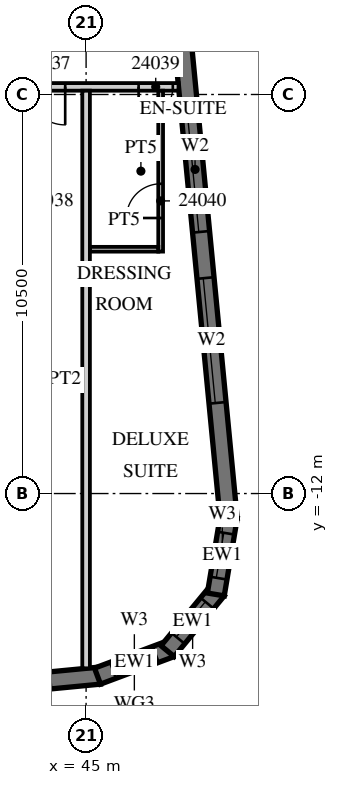
"""IFC4 building model, lengths in metres.
Left out: names, types, materials, properties, quantities, classifications, styles, units other than length and angle.
Written with IfcOpenShell. Run it as: python <this file> out.ifc"""

import sys

from ifc_helpers import new_model, si_unit, direction, frame, frame_2d, origin, place, context, subcontext, project, spatial, polyline, rectangle, outline, extrude, element, fill, save


model = new_model("IFC4")
c1 = context("Model", 3, precision=1e-05, world=origin(), true_north=direction((0.0, 1.0)))
c2 = subcontext(c1, "Body", "Model", "MODEL_VIEW")
j1 = project(units=[si_unit("LENGTHUNIT", "METRE"), si_unit("PLANEANGLEUNIT", "RADIAN")], contexts=[c1])
p1 = place(None, origin())
s1 = spatial("IfcSite", under=j1, at=p1, CompositionType="ELEMENT")
p2 = place(p1, origin())
s2 = spatial("IfcBuilding", under=s1, at=p2, CompositionType="ELEMENT")
p3 = place(p2, frame((0.0, 0.0, 114.1)))
s3 = spatial("IfcBuildingStorey", under=s2, at=p3, CompositionType="ELEMENT", Elevation=114.1)
p4 = place(p3, frame((-13.521, -22.46, 0.0), z_axis=(0.0, 0.0, 1.0), x_axis=(0.995396096335, 0.095846812164, 0.0)))
e1 = element("IfcWall", 1, at=p4, inside=s3, PredefinedType="SOLIDWALL", context=c2, shape_type="SweptSolid", body=[
    extrude(rectangle(XDim=59.151, YDim=0.45, at=frame_2d((29.575, 0.0))), origin(), (0.0, 0.0, 1.0), 3.02),
])
p5 = place(p4, frame((0.91, 0.0, 0.45)))
e2 = element("IfcOpeningElement", 2, at=p5, cuts=e1, PredefinedType="OPENING", context=c2, shape_type="SweptSolid", body=[
    extrude(rectangle(XDim=2.7, YDim=2.25, at=frame_2d((1.35, 1.125))), frame((0.0, 0.235, 0.0), z_axis=(0.0, -1.0, 0.0), x_axis=(1.0, 0.0, 0.0)), (0.0, 0.0, 1.0), 0.47),
])
p6 = place(p4, frame((5.431, 0.0, 0.45)))
e3 = element("IfcOpeningElement", 3, at=p6, cuts=e1, PredefinedType="OPENING", context=c2, shape_type="SweptSolid", body=[
    extrude(rectangle(XDim=2.7, YDim=2.25, at=frame_2d((1.35, 1.125))), frame((0.0, 0.235, 0.0), z_axis=(0.0, -1.0, 0.0), x_axis=(1.0, 0.0, 0.0)), (0.0, 0.0, 1.0), 0.47),
])
p7 = place(p4, frame((9.952, 0.0, 0.45)))
e4 = element("IfcOpeningElement", 4, at=p7, cuts=e1, PredefinedType="OPENING", context=c2, shape_type="SweptSolid", body=[
    extrude(rectangle(XDim=2.7, YDim=2.25, at=frame_2d((1.35, 1.125))), frame((0.0, 0.235, 0.0), z_axis=(0.0, -1.0, 0.0), x_axis=(1.0, 0.0, 0.0)), (0.0, 0.0, 1.0), 0.47),
])
p8 = place(p4, frame((14.473, 0.0, 0.45)))
e5 = element("IfcOpeningElement", 5, at=p8, cuts=e1, PredefinedType="OPENING", context=c2, shape_type="SweptSolid", body=[
    extrude(rectangle(XDim=2.7, YDim=2.25, at=frame_2d((1.35, 1.125))), frame((0.0, 0.235, 0.0), z_axis=(0.0, -1.0, 0.0), x_axis=(1.0, 0.0, 0.0)), (0.0, 0.0, 1.0), 0.47),
])
p9 = place(p4, frame((18.994, 0.0, 0.45)))
e6 = element("IfcOpeningElement", 6, at=p9, cuts=e1, PredefinedType="OPENING", context=c2, shape_type="SweptSolid", body=[
    extrude(rectangle(XDim=2.7, YDim=2.25, at=frame_2d((1.35, 1.125))), frame((0.0, 0.235, 0.0), z_axis=(0.0, -1.0, 0.0), x_axis=(1.0, 0.0, 0.0)), (0.0, 0.0, 1.0), 0.47),
])
p10 = place(p4, frame((23.514, 0.0, 0.45)))
e7 = element("IfcOpeningElement", 7, at=p10, cuts=e1, PredefinedType="OPENING", context=c2, shape_type="SweptSolid", body=[
    extrude(rectangle(XDim=2.7, YDim=2.25, at=frame_2d((1.35, 1.125))), frame((0.0, 0.235, 0.0), z_axis=(0.0, -1.0, 0.0), x_axis=(1.0, 0.0, 0.0)), (0.0, 0.0, 1.0), 0.47),
])
p11 = place(p4, frame((28.035, 0.0, 0.45)))
e8 = element("IfcOpeningElement", 8, at=p11, cuts=e1, PredefinedType="OPENING", context=c2, shape_type="SweptSolid", body=[
    extrude(rectangle(XDim=2.7, YDim=2.25, at=frame_2d((1.35, 1.125))), frame((0.0, 0.235, 0.0), z_axis=(0.0, -1.0, 0.0), x_axis=(1.0, 0.0, 0.0)), (0.0, 0.0, 1.0), 0.47),
])
p12 = place(p4, frame((32.556, 0.0, 0.45)))
e9 = element("IfcOpeningElement", 9, at=p12, cuts=e1, PredefinedType="OPENING", context=c2, shape_type="SweptSolid", body=[
    extrude(rectangle(XDim=2.7, YDim=2.25, at=frame_2d((1.35, 1.125))), frame((0.0, 0.235, 0.0), z_axis=(0.0, -1.0, 0.0), x_axis=(1.0, 0.0, 0.0)), (0.0, 0.0, 1.0), 0.47),
])
p13 = place(p4, frame((37.077, 0.0, 0.45)))
e10 = element("IfcOpeningElement", 10, at=p13, cuts=e1, PredefinedType="OPENING", context=c2, shape_type="SweptSolid", body=[
    extrude(rectangle(XDim=2.7, YDim=2.25, at=frame_2d((1.35, 1.125))), frame((0.0, 0.235, 0.0), z_axis=(0.0, -1.0, 0.0), x_axis=(1.0, 0.0, 0.0)), (0.0, 0.0, 1.0), 0.47),
])
p14 = place(p4, frame((41.598, 0.0, 0.45)))
e11 = element("IfcOpeningElement", 11, at=p14, cuts=e1, PredefinedType="OPENING", context=c2, shape_type="SweptSolid", body=[
    extrude(rectangle(XDim=2.7, YDim=2.25, at=frame_2d((1.35, 1.125))), frame((0.0, 0.235, 0.0), z_axis=(0.0, -1.0, 0.0), x_axis=(1.0, 0.0, 0.0)), (0.0, 0.0, 1.0), 0.47),
])
p15 = place(p4, frame((46.118, 0.0, 0.45)))
e12 = element("IfcOpeningElement", 12, at=p15, cuts=e1, PredefinedType="OPENING", context=c2, shape_type="SweptSolid", body=[
    extrude(rectangle(XDim=2.7, YDim=2.25, at=frame_2d((1.35, 1.125))), frame((0.0, 0.235, 0.0), z_axis=(0.0, -1.0, 0.0), x_axis=(1.0, 0.0, 0.0)), (0.0, 0.0, 1.0), 0.47),
])
p16 = place(p4, frame((50.639, 0.0, 0.45)))
e13 = element("IfcOpeningElement", 13, at=p16, cuts=e1, PredefinedType="OPENING", context=c2, shape_type="SweptSolid", body=[
    extrude(rectangle(XDim=2.7, YDim=2.25, at=frame_2d((1.35, 1.125))), frame((0.0, 0.235, 0.0), z_axis=(0.0, -1.0, 0.0), x_axis=(1.0, 0.0, 0.0)), (0.0, 0.0, 1.0), 0.47),
])
p17 = place(p4, frame((55.15, 0.0, 0.45)))
e14 = element("IfcOpeningElement", 14, at=p17, cuts=e1, PredefinedType="OPENING", context=c2, shape_type="SweptSolid", body=[
    extrude(rectangle(XDim=2.7, YDim=2.25, at=frame_2d((1.35, 1.125))), frame((0.0, 0.235, 0.0), z_axis=(0.0, -1.0, 0.0), x_axis=(1.0, 0.0, 0.0)), (0.0, 0.0, 1.0), 0.47),
])
p18 = place(p3, frame((45.3, -16.804, 0.0), z_axis=(0.0, 0.0, 1.0), x_axis=(0.936677599948, 0.350192909346, 0.0)))
e15 = element("IfcWall", 15, at=p18, inside=s3, PredefinedType="SOLIDWALL", context=c2, shape_type="SweptSolid", body=[
    extrude(outline(polyline([(0.0, -0.225), (2.071, -0.225), (1.95, 0.225), (0.121, 0.225), (0.0, -0.225)])), origin(), (0.0, 0.0, 1.0), 3.02),
])
p19 = place(p18, frame((0.435, 0.0, 0.45)))
e16 = element("IfcOpeningElement", 16, at=p19, cuts=e15, PredefinedType="OPENING", context=c2, shape_type="SweptSolid", body=[
    extrude(rectangle(XDim=1.2, YDim=2.25, at=frame_2d((0.6, 1.125))), frame((0.0, 0.235, 0.0), z_axis=(0.0, -1.0, 0.0), x_axis=(1.0, 0.0, 0.0)), (0.0, 0.0, 1.0), 0.47),
])
p20 = place(p3, frame((47.145, -16.147, 0.0), z_axis=(0.0, 0.0, 1.0), x_axis=(0.635988241739, 0.771698747161, 0.0)))
e17 = element("IfcWall", 17, at=p20, inside=s3, PredefinedType="SOLIDWALL", context=c2, shape_type="SweptSolid", body=[
    extrude(outline(polyline([(0.0, -0.225), (2.071, -0.225), (1.95, 0.225), (0.121, 0.225), (0.0, -0.225)])), origin(), (0.0, 0.0, 1.0), 3.02),
])
p21 = place(p20, frame((0.435, 0.0, 0.45)))
e18 = element("IfcOpeningElement", 18, at=p21, cuts=e17, PredefinedType="OPENING", context=c2, shape_type="SweptSolid", body=[
    extrude(rectangle(XDim=1.2, YDim=2.25, at=frame_2d((0.6, 1.125))), frame((0.0, 0.235, 0.0), z_axis=(0.0, -1.0, 0.0), x_axis=(1.0, 0.0, 0.0)), (0.0, 0.0, 1.0), 0.47),
])
p22 = place(p3, frame((48.413, -14.655, 0.0), z_axis=(0.0, 0.0, 1.0), x_axis=(0.165068144653, 0.986282164302, 0.0)))
e19 = element("IfcWall", 19, at=p22, inside=s3, PredefinedType="SOLIDWALL", context=c2, shape_type="SweptSolid", body=[
    extrude(outline(polyline([(0.0, -0.225), (2.071, -0.225), (1.95, 0.225), (0.121, 0.225), (0.0, -0.225)])), origin(), (0.0, 0.0, 1.0), 3.02),
])
p23 = place(p22, frame((0.435, 0.0, 0.45)))
e20 = element("IfcOpeningElement", 20, at=p23, cuts=e19, PredefinedType="OPENING", context=c2, shape_type="SweptSolid", body=[
    extrude(rectangle(XDim=1.2, YDim=2.25, at=frame_2d((0.6, 1.125))), frame((0.0, 0.235, 0.0), z_axis=(0.0, -1.0, 0.0), x_axis=(1.0, 0.0, 0.0)), (0.0, 0.0, 1.0), 0.47),
])
p24 = place(p3, frame((48.753, -12.672, 0.0), z_axis=(0.0, 0.0, 1.0), x_axis=(-0.095842661909, 0.995396495954, 0.0)))
e21 = element("IfcWall", 21, at=p24, inside=s3, PredefinedType="SOLIDWALL", context=c2, shape_type="SweptSolid", body=[
    extrude(rectangle(XDim=35.0, YDim=0.45, at=frame_2d((17.5, 0.0))), origin(), (0.0, 0.0, 1.0), 3.02),
])
p25 = place(p24, frame((3.072, 0.0, 0.45)))
e22 = element("IfcOpeningElement", 22, at=p25, cuts=e21, PredefinedType="OPENING", context=c2, shape_type="SweptSolid", body=[
    extrude(rectangle(XDim=3.3, YDim=2.25, at=frame_2d((1.65, 1.125))), frame((0.0, 0.235, 0.0), z_axis=(0.0, -1.0, 0.0), x_axis=(1.0, 0.0, 0.0)), (0.0, 0.0, 1.0), 0.47),
])
p26 = place(p24, frame((7.593, 0.0, 0.45)))
e23 = element("IfcOpeningElement", 23, at=p26, cuts=e21, PredefinedType="OPENING", context=c2, shape_type="SweptSolid", body=[
    extrude(rectangle(XDim=3.3, YDim=2.25, at=frame_2d((1.65, 1.125))), frame((0.0, 0.235, 0.0), z_axis=(0.0, -1.0, 0.0), x_axis=(1.0, 0.0, 0.0)), (0.0, 0.0, 1.0), 0.47),
])
p27 = place(p3, frame((-13.5, -1.3, 0.0), z_axis=(0.0, 0.0, 1.0), x_axis=(1.0, 0.0, 0.0)))
e24 = element("IfcWall", 24, at=p27, inside=s3, PredefinedType="PARTITIONING", context=c2, shape_type="SweptSolid", body=[
    extrude(rectangle(XDim=60.932, YDim=0.2, at=frame_2d((30.466, 0.0))), origin(), (0.0, 0.0, 1.0), 3.02),
])
p28 = place(p27, frame((0.575, 0.0, 0.0)))
e25 = element("IfcOpeningElement", 25, at=p28, cuts=e24, PredefinedType="OPENING", context=c2, shape_type="SweptSolid", body=[
    extrude(rectangle(XDim=1.0, YDim=2.1, at=frame_2d((0.5, 1.05))), frame((0.0, 0.11, 0.0), z_axis=(0.0, -1.0, 0.0), x_axis=(1.0, 0.0, 0.0)), (0.0, 0.0, 1.0), 0.22),
])
p29 = place(p27, frame((5.075, 0.0, 0.0)))
e26 = element("IfcOpeningElement", 26, at=p29, cuts=e24, PredefinedType="OPENING", context=c2, shape_type="SweptSolid", body=[
    extrude(rectangle(XDim=1.0, YDim=2.1, at=frame_2d((0.5, 1.05))), frame((0.0, 0.11, 0.0), z_axis=(0.0, -1.0, 0.0), x_axis=(1.0, 0.0, 0.0)), (0.0, 0.0, 1.0), 0.22),
])
p30 = place(p27, frame((11.925, 0.0, 0.0)))
e27 = element("IfcOpeningElement", 27, at=p30, cuts=e24, PredefinedType="OPENING", context=c2, shape_type="SweptSolid", body=[
    extrude(rectangle(XDim=1.0, YDim=2.1, at=frame_2d((0.5, 1.05))), frame((0.0, 0.11, 0.0), z_axis=(0.0, -1.0, 0.0), x_axis=(1.0, 0.0, 0.0)), (0.0, 0.0, 1.0), 0.22),
])
p31 = place(p27, frame((15.938, 0.0, 0.0)))
e28 = element("IfcOpeningElement", 28, at=p31, cuts=e24, PredefinedType="OPENING", context=c2, shape_type="SweptSolid", body=[
    extrude(rectangle(XDim=1.2, YDim=2.1, at=frame_2d((0.6, 1.05))), frame((0.0, 0.11, 0.0), z_axis=(0.0, -1.0, 0.0), x_axis=(1.0, 0.0, 0.0)), (0.0, 0.0, 1.0), 0.22),
])
p32 = place(p27, frame((25.45, 0.0, 0.0)))
e29 = element("IfcOpeningElement", 29, at=p32, cuts=e24, PredefinedType="OPENING", context=c2, shape_type="SweptSolid", body=[
    extrude(rectangle(XDim=1.0, YDim=2.1, at=frame_2d((0.5, 1.05))), frame((0.0, 0.11, 0.0), z_axis=(0.0, -1.0, 0.0), x_axis=(1.0, 0.0, 0.0)), (0.0, 0.0, 1.0), 0.22),
])
p33 = place(p27, frame((27.55, 0.0, 0.0)))
e30 = element("IfcOpeningElement", 30, at=p33, cuts=e24, PredefinedType="OPENING", context=c2, shape_type="SweptSolid", body=[
    extrude(rectangle(XDim=1.0, YDim=2.1, at=frame_2d((0.5, 1.05))), frame((0.0, 0.11, 0.0), z_axis=(0.0, -1.0, 0.0), x_axis=(1.0, 0.0, 0.0)), (0.0, 0.0, 1.0), 0.22),
])
p34 = place(p27, frame((33.938, 0.0, 0.0)))
e31 = element("IfcOpeningElement", 31, at=p34, cuts=e24, PredefinedType="OPENING", context=c2, shape_type="SweptSolid", body=[
    extrude(rectangle(XDim=1.2, YDim=2.1, at=frame_2d((0.6, 1.05))), frame((0.0, 0.11, 0.0), z_axis=(0.0, -1.0, 0.0), x_axis=(1.0, 0.0, 0.0)), (0.0, 0.0, 1.0), 0.22),
])
p35 = place(p27, frame((45.862, 0.0, 0.0)))
e32 = element("IfcOpeningElement", 32, at=p35, cuts=e24, PredefinedType="OPENING", context=c2, shape_type="SweptSolid", body=[
    extrude(rectangle(XDim=1.2, YDim=2.1, at=frame_2d((0.6, 1.05))), frame((0.0, 0.11, 0.0), z_axis=(0.0, -1.0, 0.0), x_axis=(1.0, 0.0, 0.0)), (0.0, 0.0, 1.0), 0.22),
])
p36 = place(p27, frame((52.425, 0.0, 0.0)))
e33 = element("IfcOpeningElement", 33, at=p36, cuts=e24, PredefinedType="OPENING", context=c2, shape_type="SweptSolid", body=[
    extrude(rectangle(XDim=1.0, YDim=2.1, at=frame_2d((0.5, 1.05))), frame((0.0, 0.11, 0.0), z_axis=(0.0, -1.0, 0.0), x_axis=(1.0, 0.0, 0.0)), (0.0, 0.0, 1.0), 0.22),
])
p37 = place(p27, frame((56.95, 0.0, 0.0)))
e34 = element("IfcOpeningElement", 34, at=p37, cuts=e24, PredefinedType="OPENING", context=c2, shape_type="SweptSolid", body=[
    extrude(rectangle(XDim=1.0, YDim=2.1, at=frame_2d((0.5, 1.05))), frame((0.0, 0.11, 0.0), z_axis=(0.0, -1.0, 0.0), x_axis=(1.0, 0.0, 0.0)), (0.0, 0.0, 1.0), 0.22),
])
p38 = place(p27, frame((59.882, 0.0, 0.0)))
e35 = element("IfcOpeningElement", 35, at=p38, cuts=e24, PredefinedType="OPENING", context=c2, shape_type="SweptSolid", body=[
    extrude(rectangle(XDim=0.9, YDim=2.1, at=frame_2d((0.45, 1.05))), frame((0.0, 0.11, 0.0), z_axis=(0.0, -1.0, 0.0), x_axis=(1.0, 0.0, 0.0)), (0.0, 0.0, 1.0), 0.22),
])
p39 = place(p3, frame((45.0, -16.599, 0.0), z_axis=(0.0, 0.0, 1.0), x_axis=(0.0, 1.0, 0.0)))
e36 = element("IfcWall", 36, at=p39, inside=s3, PredefinedType="PARTITIONING", context=c2, shape_type="SweptSolid", body=[
    extrude(rectangle(XDim=15.199, YDim=0.2, at=frame_2d((7.6, 0.0))), origin(), (0.0, 0.0, 1.0), 3.02),
])
p40 = place(p3, frame((46.962, -5.634, 0.0), z_axis=(0.0, 0.0, 1.0), x_axis=(0.0, 1.0, 0.0)))
e37 = element("IfcWall", 37, at=p40, inside=s3, PredefinedType="PARTITIONING", context=c2, shape_type="SweptSolid", body=[
    extrude(rectangle(XDim=4.234, YDim=0.125, at=frame_2d((2.117, 0.0))), origin(), (0.0, 0.0, 1.0), 3.02),
])
p41 = place(p40, frame((0.884, 0.0, 0.0)))
e38 = element("IfcOpeningElement", 38, at=p41, cuts=e37, PredefinedType="OPENING", context=c2, shape_type="SweptSolid", body=[
    extrude(rectangle(XDim=0.9, YDim=2.1, at=frame_2d((0.45, 1.05))), frame((0.0, 0.073, 0.0), z_axis=(0.0, -1.0, 0.0), x_axis=(1.0, 0.0, 0.0)), (0.0, 0.0, 1.0), 0.145),
])
p42 = place(p3, frame((45.1, -5.572, 0.0), z_axis=(0.0, 0.0, 1.0), x_axis=(1.0, 0.0, 0.0)))
e39 = element("IfcWall", 39, at=p42, inside=s3, PredefinedType="PARTITIONING", context=c2, shape_type="SweptSolid", body=[
    extrude(rectangle(XDim=1.8, YDim=0.125, at=frame_2d((0.9, 0.0))), origin(), (0.0, 0.0, 1.0), 3.02),
])
p43 = place(p19, origin())
e40 = element("IfcWindow", 40, at=p43, inside=s3, PartitioningType="SINGLE_PANEL", PredefinedType="WINDOW", context=c2, shape_type="SweptSolid", body=[
    extrude(rectangle(XDim=1.2, YDim=2.25, at=frame_2d((0.6, 1.125))), frame((0.0, 0.09, 0.0), z_axis=(0.0, -1.0, 0.0), x_axis=(1.0, 0.0, 0.0)), (0.0, 0.0, 1.0), 0.06),
])
fill(e16, e40)
p44 = place(p21, origin())
e41 = element("IfcWindow", 41, at=p44, inside=s3, PartitioningType="SINGLE_PANEL", PredefinedType="WINDOW", context=c2, shape_type="SweptSolid", body=[
    extrude(rectangle(XDim=1.2, YDim=2.25, at=frame_2d((0.6, 1.125))), frame((0.0, 0.09, 0.0), z_axis=(0.0, -1.0, 0.0), x_axis=(1.0, 0.0, 0.0)), (0.0, 0.0, 1.0), 0.06),
])
fill(e18, e41)
p45 = place(p23, origin())
e42 = element("IfcWindow", 42, at=p45, inside=s3, PartitioningType="SINGLE_PANEL", PredefinedType="WINDOW", context=c2, shape_type="SweptSolid", body=[
    extrude(rectangle(XDim=1.2, YDim=2.25, at=frame_2d((0.6, 1.125))), frame((0.0, 0.09, 0.0), z_axis=(0.0, -1.0, 0.0), x_axis=(1.0, 0.0, 0.0)), (0.0, 0.0, 1.0), 0.06),
])
fill(e20, e42)
p46 = place(p25, origin())
e43 = element("IfcWindow", 43, at=p46, inside=s3, PartitioningType="SINGLE_PANEL", PredefinedType="WINDOW", context=c2, shape_type="SweptSolid", body=[
    extrude(rectangle(XDim=3.3, YDim=2.25, at=frame_2d((1.65, 1.125))), frame((0.0, 0.09, 0.0), z_axis=(0.0, -1.0, 0.0), x_axis=(1.0, 0.0, 0.0)), (0.0, 0.0, 1.0), 0.06),
])
fill(e22, e43)
p47 = place(p26, origin())
e44 = element("IfcWindow", 44, at=p47, inside=s3, PartitioningType="SINGLE_PANEL", PredefinedType="WINDOW", context=c2, shape_type="SweptSolid", body=[
    extrude(rectangle(XDim=3.3, YDim=2.25, at=frame_2d((1.65, 1.125))), frame((0.0, 0.09, 0.0), z_axis=(0.0, -1.0, 0.0), x_axis=(1.0, 0.0, 0.0)), (0.0, 0.0, 1.0), 0.06),
])
fill(e23, e44)
p48 = place(p37, origin())
e45 = element("IfcDoor", 45, at=p48, inside=s3, OperationType="SINGLE_SWING_RIGHT", PredefinedType="DOOR", context=c2, shape_type="SweptSolid", body=[
    extrude(rectangle(XDim=1.0, YDim=2.1, at=frame_2d((0.5, 1.05))), frame((0.0, 0.025, 0.0), z_axis=(0.0, -1.0, 0.0), x_axis=(1.0, 0.0, 0.0)), (0.0, 0.0, 1.0), 0.05),
])
fill(e34, e45)
p49 = place(p38, origin())
e46 = element("IfcDoor", 46, at=p49, inside=s3, OperationType="SINGLE_SWING_LEFT", PredefinedType="DOOR", context=c2, shape_type="SweptSolid", body=[
    extrude(rectangle(XDim=0.9, YDim=2.1, at=frame_2d((0.45, 1.05))), frame((0.0, 0.025, 0.0), z_axis=(0.0, -1.0, 0.0), x_axis=(1.0, 0.0, 0.0)), (0.0, 0.0, 1.0), 0.05),
])
fill(e35, e46)
p50 = place(p41, origin())
e47 = element("IfcDoor", 47, at=p50, inside=s3, OperationType="SINGLE_SWING_LEFT", PredefinedType="DOOR", context=c2, shape_type="SweptSolid", body=[
    extrude(rectangle(XDim=0.9, YDim=2.1, at=frame_2d((0.45, 1.05))), frame((0.0, 0.025, 0.0), z_axis=(0.0, -1.0, 0.0), x_axis=(1.0, 0.0, 0.0)), (0.0, 0.0, 1.0), 0.05),
])
fill(e38, e47)
save(model, sys.argv[1])
